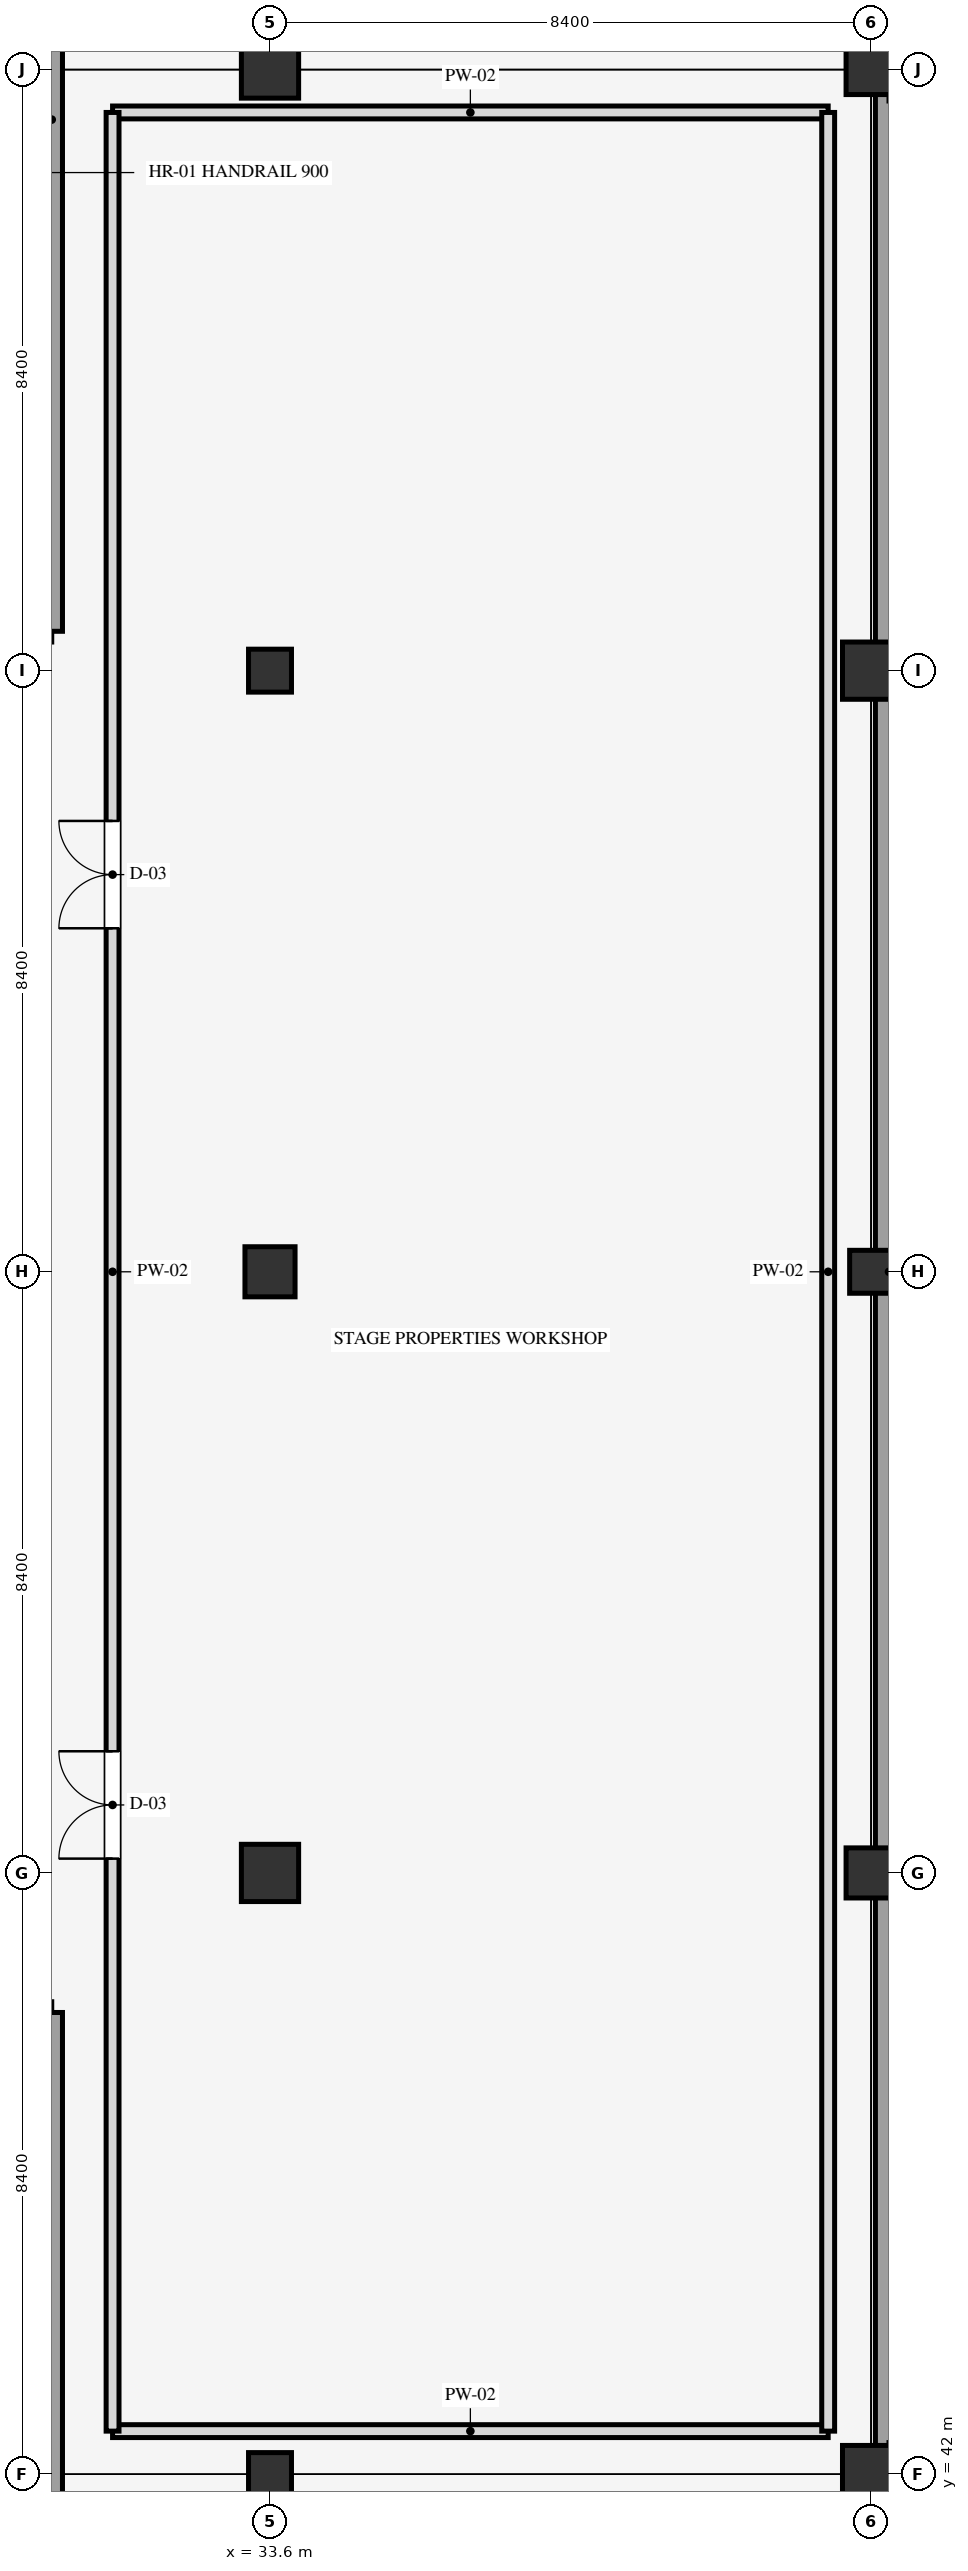
"""IFC4 building model, lengths in metres.
Left out: names, types, materials, properties, quantities, classifications, styles, units other than length and angle.
Written with IfcOpenShell. Run it as: python <this file> out.ifc"""

import sys

from ifc_helpers import new_model, si_unit, direction, frame, frame_2d, origin, origin_2d, place, context, subcontext, project, spatial, rectangle, extrude, element, fill, save


model = new_model("IFC4")
c1 = context("Model", 3, precision=1e-05, world=origin(), true_north=direction((0.0, 1.0)))
c2 = subcontext(c1, "Body", "Model", "MODEL_VIEW")
j1 = project(units=[si_unit("LENGTHUNIT", "METRE"), si_unit("PLANEANGLEUNIT", "RADIAN")], contexts=[c1])
p1 = place(None, origin())
s1 = spatial("IfcSite", under=j1, at=p1, CompositionType="ELEMENT")
p2 = place(p1, origin())
s2 = spatial("IfcBuilding", under=s1, at=p2, CompositionType="ELEMENT")
p3 = place(p2, frame((0.0, 0.0, 5.4)))
s3 = spatial("IfcBuildingStorey", under=s2, at=p3, CompositionType="ELEMENT", Elevation=5.4)
p4 = place(p3, frame((33.6, 42.0, 0.0), z_axis=(0.0, 0.0, 1.0), x_axis=(1.0, 0.0, 0.0)))
e1 = element("IfcColumn", 1, at=p4, inside=s3, PredefinedType="COLUMN", context=c2, shape_type="SweptSolid", body=[
    extrude(rectangle(XDim=0.6, YDim=0.6, at=origin_2d()), origin(), (0.0, 0.0, 1.0), 4.5),
])
p5 = place(p3, frame((33.6, 50.4, 0.0), z_axis=(0.0, 0.0, 1.0), x_axis=(1.0, 0.0, 0.0)))
e2 = element("IfcColumn", 2, at=p5, inside=s3, PredefinedType="COLUMN", context=c2, shape_type="SweptSolid", body=[
    extrude(rectangle(XDim=0.8, YDim=0.8, at=origin_2d()), origin(), (0.0, 0.0, 1.0), 4.5),
])
p6 = place(p3, frame((33.6, 58.8, 0.0), z_axis=(0.0, 0.0, 1.0), x_axis=(1.0, 0.0, 0.0)))
e3 = element("IfcColumn", 3, at=p6, inside=s3, PredefinedType="COLUMN", context=c2, shape_type="SweptSolid", body=[
    extrude(rectangle(XDim=0.7, YDim=0.7, at=origin_2d()), origin(), (0.0, 0.0, 1.0), 4.5),
])
p7 = place(p3, frame((33.6, 67.2, 0.0), z_axis=(0.0, 0.0, 1.0), x_axis=(1.0, 0.0, 0.0)))
e4 = element("IfcColumn", 4, at=p7, inside=s3, PredefinedType="COLUMN", context=c2, shape_type="SweptSolid", body=[
    extrude(rectangle(XDim=0.6, YDim=0.6, at=origin_2d()), origin(), (0.0, 0.0, 1.0), 4.5),
])
for number, where, z_axis, x_axis in (
    (5, (33.6, 75.6, 0.0), (0.0, 0.0, 1.0), (1.0, 0.0, 0.0)),
    (6, (42.0, 42.0, 0.0), (0.0, 0.0, 1.0), (1.0, 0.0, 0.0)),
):
    element("IfcColumn", number, at=place(p3, frame(where, z_axis=z_axis, x_axis=x_axis)), inside=s3, PredefinedType="COLUMN", context=c2, shape_type="SweptSolid", body=[
        extrude(rectangle(XDim=0.8, YDim=0.8, at=origin_2d()), origin(), (0.0, 0.0, 1.0), 4.5),
    ])
p8 = place(p3, frame((42.0, 50.4, 0.0), z_axis=(0.0, 0.0, 1.0), x_axis=(1.0, 0.0, 0.0)))
e7 = element("IfcColumn", 7, at=p8, inside=s3, PredefinedType="COLUMN", context=c2, shape_type="SweptSolid", body=[
    extrude(rectangle(XDim=0.7, YDim=0.7, at=origin_2d()), origin(), (0.0, 0.0, 1.0), 4.5),
])
p9 = place(p3, frame((42.0, 58.8, 0.0), z_axis=(0.0, 0.0, 1.0), x_axis=(1.0, 0.0, 0.0)))
e8 = element("IfcColumn", 8, at=p9, inside=s3, PredefinedType="COLUMN", context=c2, shape_type="SweptSolid", body=[
    extrude(rectangle(XDim=0.6, YDim=0.6, at=origin_2d()), origin(), (0.0, 0.0, 1.0), 4.5),
])
p10 = place(p3, frame((42.0, 67.2, 0.0), z_axis=(0.0, 0.0, 1.0), x_axis=(1.0, 0.0, 0.0)))
e9 = element("IfcColumn", 9, at=p10, inside=s3, PredefinedType="COLUMN", context=c2, shape_type="SweptSolid", body=[
    extrude(rectangle(XDim=0.8, YDim=0.8, at=origin_2d()), origin(), (0.0, 0.0, 1.0), 4.5),
])
p11 = place(p3, frame((42.0, 75.6, 0.0), z_axis=(0.0, 0.0, 1.0), x_axis=(1.0, 0.0, 0.0)))
e10 = element("IfcColumn", 10, at=p11, inside=s3, PredefinedType="COLUMN", context=c2, shape_type="SweptSolid", body=[
    extrude(rectangle(XDim=0.7, YDim=0.7, at=origin_2d()), origin(), (0.0, 0.0, 1.0), 4.5),
])
for number, where, z_axis, x_axis in (
    (11, (30.55, 34.15, 0.0), (0.0, 0.0, 1.0), (0.0, 1.0, 0.0)),
    (12, (30.55, 67.75, 0.0), (0.0, 0.0, 1.0), (0.0, 1.0, 0.0)),
):
    element("IfcWall", number, at=place(p3, frame(where, z_axis=z_axis, x_axis=x_axis)), inside=s3, PredefinedType="SHEAR", context=c2, shape_type="SweptSolid", body=[
        extrude(rectangle(XDim=14.3, YDim=0.3, at=frame_2d((7.15, 0.0))), origin(), (0.0, 0.0, 1.0), 4.5),
    ])
p12 = place(p3, frame((42.25, 42.25, 0.0), z_axis=(0.0, 0.0, 1.0), x_axis=(0.0, 1.0, 0.0)))
e13 = element("IfcWall", 13, at=p12, inside=s3, PredefinedType="SHEAR", context=c2, shape_type="SweptSolid", body=[
    extrude(rectangle(XDim=33.1, YDim=0.38, at=frame_2d((16.55, 0.0))), origin(), (0.0, 0.0, 1.0), 4.2),
])
for number, where, z_axis, x_axis in (
    (14, (31.4, 42.6, 0.0), (0.0, 0.0, 1.0), (1.0, 0.0, 0.0)),
    (15, (31.4, 75.0, 0.0), (0.0, 0.0, 1.0), (1.0, 0.0, 0.0)),
):
    element("IfcWall", number, at=place(p3, frame(where, z_axis=z_axis, x_axis=x_axis)), inside=s3, PredefinedType="PARTITIONING", context=c2, shape_type="SweptSolid", body=[
        extrude(rectangle(XDim=10.0, YDim=0.18, at=frame_2d((5.0, 0.0))), origin(), (0.0, 0.0, 1.0), 3.54),
    ])
p13 = place(p3, frame((31.4, 42.6, 0.0), z_axis=(0.0, 0.0, 1.0), x_axis=(0.0, 1.0, 0.0)))
e16 = element("IfcWall", 16, at=p13, inside=s3, PredefinedType="PARTITIONING", context=c2, shape_type="SweptSolid", body=[
    extrude(rectangle(XDim=32.4, YDim=0.18, at=frame_2d((16.2, 0.0))), origin(), (0.0, 0.0, 1.0), 3.54),
])
p14 = place(p13, frame((8.0, 0.0, 0.0)))
e17 = element("IfcOpeningElement", 17, at=p14, cuts=e16, PredefinedType="OPENING", context=c2, shape_type="SweptSolid", body=[
    extrude(rectangle(XDim=1.5, YDim=2.2, at=frame_2d((0.75, 1.1))), frame((0.0, 0.1, 0.0), z_axis=(0.0, -1.0, 0.0), x_axis=(1.0, 0.0, 0.0)), (0.0, 0.0, 1.0), 0.2),
])
p15 = place(p13, frame((21.0, 0.0, 0.0)))
e18 = element("IfcOpeningElement", 18, at=p15, cuts=e16, PredefinedType="OPENING", context=c2, shape_type="SweptSolid", body=[
    extrude(rectangle(XDim=1.5, YDim=2.2, at=frame_2d((0.75, 1.1))), frame((0.0, 0.1, 0.0), z_axis=(0.0, -1.0, 0.0), x_axis=(1.0, 0.0, 0.0)), (0.0, 0.0, 1.0), 0.2),
])
p16 = place(p3, frame((41.4, 42.6, 0.0), z_axis=(0.0, 0.0, 1.0), x_axis=(0.0, 1.0, 0.0)))
e19 = element("IfcWall", 19, at=p16, inside=s3, PredefinedType="PARTITIONING", context=c2, shape_type="SweptSolid", body=[
    extrude(rectangle(XDim=32.4, YDim=0.18, at=frame_2d((16.2, 0.0))), origin(), (0.0, 0.0, 1.0), 3.54),
])
p17 = place(p14, origin())
e20 = element("IfcDoor", 20, at=p17, inside=s3, OperationType="DOUBLE_DOOR_SINGLE_SWING", PredefinedType="DOOR", context=c2, shape_type="SweptSolid", body=[
    extrude(rectangle(XDim=1.5, YDim=2.2, at=frame_2d((0.75, 1.1))), frame((0.0, 0.025, 0.0), z_axis=(0.0, -1.0, 0.0), x_axis=(1.0, 0.0, 0.0)), (0.0, 0.0, 1.0), 0.05),
])
fill(e17, e20)
p18 = place(p15, origin())
e21 = element("IfcDoor", 21, at=p18, inside=s3, OperationType="DOUBLE_DOOR_SINGLE_SWING", PredefinedType="DOOR", context=c2, shape_type="SweptSolid", body=[
    extrude(rectangle(XDim=1.5, YDim=2.2, at=frame_2d((0.75, 1.1))), frame((0.0, 0.025, 0.0), z_axis=(0.0, -1.0, 0.0), x_axis=(1.0, 0.0, 0.0)), (0.0, 0.0, 1.0), 0.05),
])
fill(e18, e21)
save(model, sys.argv[1])
